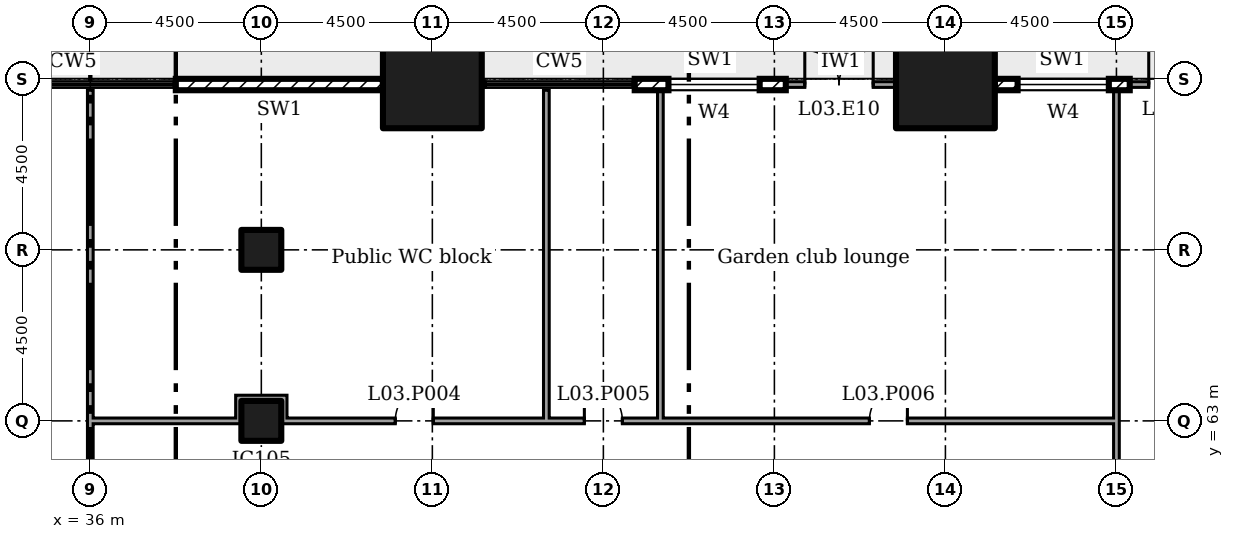
"""IFC4 building model, lengths in metres.
Left out: names, types, materials, properties, quantities, classifications, styles, units other than length and angle.
Written with IfcOpenShell. Run it as: python <this file> out.ifc"""

import sys

from ifc_helpers import new_model, si_unit, direction, frame, frame_2d, origin, origin_2d, place, context, subcontext, project, spatial, rectangle, extrude, element, fill, save


model = new_model("IFC4")
c1 = context("Model", 3, precision=1e-05, world=origin(), true_north=direction((0.0, 1.0)))
c2 = subcontext(c1, "Body", "Model", "MODEL_VIEW")
j1 = project(units=[si_unit("LENGTHUNIT", "METRE"), si_unit("PLANEANGLEUNIT", "RADIAN")], contexts=[c1])
p1 = place(None, origin())
s1 = spatial("IfcSite", under=j1, at=p1, CompositionType="ELEMENT")
p2 = place(p1, origin())
s2 = spatial("IfcBuilding", under=s1, at=p2, CompositionType="ELEMENT")
p3 = place(p2, frame((0.0, 0.0, 16.5)))
s3 = spatial("IfcBuildingStorey", under=s2, at=p3, CompositionType="ELEMENT", Elevation=16.5)
for number, where in (
    (1, (45.0, 72.0, 0.0)),
    (2, (58.5, 72.0, 0.0)),
):
    element("IfcColumn", number, at=place(p3, frame(where)), inside=s3, PredefinedType="COLUMN", context=c2, shape_type="SweptSolid", body=[
        extrude(rectangle(XDim=2.6, YDim=2.6, at=origin_2d()), origin(), (0.0, 0.0, 1.0), 4.5),
    ])
for number, where in (
    (3, (40.5, 63.0, 0.0)),
    (4, (40.5, 67.5, 0.0)),
):
    element("IfcColumn", number, at=place(p3, frame(where)), inside=s3, PredefinedType="COLUMN", context=c2, shape_type="SweptSolid", body=[
        extrude(rectangle(XDim=1.05, YDim=1.05, at=origin_2d()), origin(), (0.0, 0.0, 1.0), 4.5),
    ])
p4 = place(p3, frame((66.2, 71.85, 0.0), z_axis=(0.0, 0.0, 1.0), x_axis=(-1.0, 0.0, 0.0)))
e5 = element("IfcWall", 5, at=p4, inside=s3, PredefinedType="SOLIDWALL", context=c2, shape_type="SweptSolid", body=[
    extrude(rectangle(XDim=2.85, YDim=0.15, at=frame_2d((1.425, 0.0))), origin(), (0.0, 0.0, 1.0), 2.25),
])
p5 = place(p4, frame((0.55, 0.0, 0.0)))
e6 = element("IfcOpeningElement", 6, at=p5, cuts=e5, PredefinedType="OPENING", context=c2, shape_type="SweptSolid", body=[
    extrude(rectangle(XDim=1.8, YDim=2.1, at=frame_2d((0.9, 1.05))), frame((0.0, 0.085, 0.0), z_axis=(0.0, -1.0, 0.0), x_axis=(1.0, 0.0, 0.0)), (0.0, 0.0, 1.0), 0.17),
])
p6 = place(p3, frame((63.35, 71.85, 0.0), z_axis=(0.0, 0.0, 1.0), x_axis=(-1.0, 0.0, 0.0)))
e7 = element("IfcWall", 7, at=p6, inside=s3, PredefinedType="ELEMENTEDWALL", context=c2, shape_type="SweptSolid", body=[
    extrude(rectangle(XDim=3.55, YDim=0.3, at=frame_2d((1.775, 0.0))), origin(), (0.0, 0.0, 1.0), 2.25),
])
p7 = place(p6, frame((0.55, 0.0, 0.45)))
e8 = element("IfcOpeningElement", 8, at=p7, cuts=e7, PredefinedType="OPENING", context=c2, shape_type="SweptSolid", body=[
    extrude(rectangle(XDim=2.4, YDim=1.7, at=frame_2d((1.2, 0.85))), frame((0.0, 0.16, 0.0), z_axis=(0.0, -1.0, 0.0), x_axis=(1.0, 0.0, 0.0)), (0.0, 0.0, 1.0), 0.32),
])
p8 = place(p3, frame((57.2, 71.85, 0.0), z_axis=(0.0, 0.0, 1.0), x_axis=(-1.0, 0.0, 0.0)))
e9 = element("IfcWall", 9, at=p8, inside=s3, PredefinedType="SOLIDWALL", context=c2, shape_type="SweptSolid", body=[
    extrude(rectangle(XDim=2.9, YDim=0.15, at=frame_2d((1.45, 0.0))), origin(), (0.0, 0.0, 1.0), 2.25),
])
p9 = place(p8, frame((0.6, 0.0, 0.0)))
e10 = element("IfcOpeningElement", 10, at=p9, cuts=e9, PredefinedType="OPENING", context=c2, shape_type="SweptSolid", body=[
    extrude(rectangle(XDim=1.8, YDim=2.1, at=frame_2d((0.9, 1.05))), frame((0.0, 0.085, 0.0), z_axis=(0.0, -1.0, 0.0), x_axis=(1.0, 0.0, 0.0)), (0.0, 0.0, 1.0), 0.17),
])
p10 = place(p3, frame((54.3, 71.85, 0.0), z_axis=(0.0, 0.0, 1.0), x_axis=(-1.0, 0.0, 0.0)))
e11 = element("IfcWall", 11, at=p10, inside=s3, PredefinedType="ELEMENTEDWALL", context=c2, shape_type="SweptSolid", body=[
    extrude(rectangle(XDim=3.975, YDim=0.3, at=frame_2d((1.988, 0.0))), origin(), (0.0, 0.0, 1.0), 2.25),
])
p11 = place(p10, frame((0.688, 0.0, 0.45)))
e12 = element("IfcOpeningElement", 12, at=p11, cuts=e11, PredefinedType="OPENING", context=c2, shape_type="SweptSolid", body=[
    extrude(rectangle(XDim=2.4, YDim=1.7, at=frame_2d((1.2, 0.85))), frame((0.0, 0.16, 0.0), z_axis=(0.0, -1.0, 0.0), x_axis=(1.0, 0.0, 0.0)), (0.0, 0.0, 1.0), 0.32),
])
p12 = place(p3, frame((43.7, 71.85, 0.0), z_axis=(0.0, 0.0, 1.0), x_axis=(-1.0, 0.0, 0.0)))
e13 = element("IfcWall", 13, at=p12, inside=s3, PredefinedType="ELEMENTEDWALL", context=c2, shape_type="SweptSolid", body=[
    extrude(rectangle(XDim=5.45, YDim=0.3, at=frame_2d((2.725, 0.0))), origin(), (0.0, 0.0, 1.0), 2.25),
])
p13 = place(p3, frame((63.0, 59.02, 0.0), z_axis=(0.0, 0.0, 1.0), x_axis=(0.0, 1.0, 0.0)))
e14 = element("IfcWall", 14, at=p13, inside=s3, PredefinedType="PARTITIONING", context=c2, shape_type="SweptSolid", body=[
    extrude(rectangle(XDim=4.055, YDim=0.15, at=frame_2d((2.027, 0.0))), origin(), (0.0, 0.0, 1.0), 4.05),
])
p14 = place(p13, frame((1.1, 0.0, 0.0)))
e15 = element("IfcOpeningElement", 15, at=p14, cuts=e14, PredefinedType="OPENING", context=c2, shape_type="SweptSolid", body=[
    extrude(rectangle(XDim=1.8, YDim=2.1, at=frame_2d((0.9, 1.05))), frame((0.0, 0.085, 0.0), z_axis=(0.0, -1.0, 0.0), x_axis=(1.0, 0.0, 0.0)), (0.0, 0.0, 1.0), 0.17),
])
p15 = place(p3, frame((63.0, 63.0, 0.0), z_axis=(0.0, 0.0, 1.0), x_axis=(0.0, 1.0, 0.0)))
e16 = element("IfcWall", 16, at=p15, inside=s3, PredefinedType="PARTITIONING", context=c2, shape_type="SweptSolid", body=[
    extrude(rectangle(XDim=8.7, YDim=0.15, at=frame_2d((4.35, 0.0))), origin(), (0.0, 0.0, 1.0), 4.05),
])
p16 = place(p3, frame((36.0, 49.5, 0.0), z_axis=(0.0, 0.0, 1.0), x_axis=(0.0, 1.0, 0.0)))
e17 = element("IfcWall", 17, at=p16, inside=s3, PredefinedType="PARTITIONING", context=c2, shape_type="SweptSolid", body=[
    extrude(rectangle(XDim=13.575, YDim=0.15, at=frame_2d((6.788, 0.0))), origin(), (0.0, 0.0, 1.0), 4.05),
])
p17 = place(p16, frame((6.25, 0.0, 0.0)))
e18 = element("IfcOpeningElement", 18, at=p17, cuts=e17, PredefinedType="OPENING", context=c2, shape_type="SweptSolid", body=[
    extrude(rectangle(XDim=1.0, YDim=2.1, at=frame_2d((0.5, 1.05))), frame((0.0, 0.085, 0.0), z_axis=(0.0, -1.0, 0.0), x_axis=(1.0, 0.0, 0.0)), (0.0, 0.0, 1.0), 0.17),
])
for number, where, z_axis, x_axis in (
    (19, (39.9, 62.925, 0.0), (0.0, 0.0, 1.0), (0.0, 1.0, 0.0)),
    (20, (41.1, 62.925, 0.0), (0.0, 0.0, 1.0), (0.0, 1.0, 0.0)),
):
    element("IfcWall", number, at=place(p3, frame(where, z_axis=z_axis, x_axis=x_axis)), inside=s3, PredefinedType="PARTITIONING", context=c2, shape_type="SweptSolid", body=[
        extrude(rectangle(XDim=0.75, YDim=0.15, at=frame_2d((0.375, 0.0))), origin(), (0.0, 0.0, 1.0), 4.05),
    ])
p18 = place(p3, frame((36.075, 63.0, 0.0)))
e21 = element("IfcWall", 21, at=p18, inside=s3, PredefinedType="PARTITIONING", context=c2, shape_type="SweptSolid", body=[
    extrude(rectangle(XDim=3.75, YDim=0.15, at=frame_2d((1.875, 0.0))), origin(), (0.0, 0.0, 1.0), 4.05),
])
p19 = place(p3, frame((41.175, 63.0, 0.0)))
e22 = element("IfcWall", 22, at=p19, inside=s3, PredefinedType="PARTITIONING", context=c2, shape_type="SweptSolid", body=[
    extrude(rectangle(XDim=6.9, YDim=0.15, at=frame_2d((3.45, 0.0))), origin(), (0.0, 0.0, 1.0), 4.05),
])
p20 = place(p19, frame((2.85, 0.0, 0.0)))
e23 = element("IfcOpeningElement", 23, at=p20, cuts=e22, PredefinedType="OPENING", context=c2, shape_type="SweptSolid", body=[
    extrude(rectangle(XDim=1.0, YDim=2.1, at=frame_2d((0.5, 1.05))), frame((0.0, 0.085, 0.0), z_axis=(0.0, -1.0, 0.0), x_axis=(1.0, 0.0, 0.0)), (0.0, 0.0, 1.0), 0.17),
])
p21 = place(p3, frame((39.975, 63.6, 0.0)))
e24 = element("IfcWall", 24, at=p21, inside=s3, PredefinedType="PARTITIONING", context=c2, shape_type="SweptSolid", body=[
    extrude(rectangle(XDim=1.05, YDim=0.15, at=frame_2d((0.525, 0.0))), origin(), (0.0, 0.0, 1.0), 4.05),
])
p22 = place(p3, frame((48.0, 63.0, 0.0)))
e25 = element("IfcWall", 25, at=p22, inside=s3, PredefinedType="PARTITIONING", context=c2, shape_type="SweptSolid", body=[
    extrude(rectangle(XDim=3.075, YDim=0.15, at=frame_2d((1.538, 0.0))), origin(), (0.0, 0.0, 1.0), 4.05),
])
p23 = place(p22, frame((1.0, 0.0, 0.0)))
e26 = element("IfcOpeningElement", 26, at=p23, cuts=e25, PredefinedType="OPENING", context=c2, shape_type="SweptSolid", body=[
    extrude(rectangle(XDim=1.0, YDim=2.1, at=frame_2d((0.5, 1.05))), frame((0.0, 0.085, 0.0), z_axis=(0.0, -1.0, 0.0), x_axis=(1.0, 0.0, 0.0)), (0.0, 0.0, 1.0), 0.17),
])
p24 = place(p3, frame((51.0, 63.0, 0.0)))
e27 = element("IfcWall", 27, at=p24, inside=s3, PredefinedType="PARTITIONING", context=c2, shape_type="SweptSolid", body=[
    extrude(rectangle(XDim=11.925, YDim=0.15, at=frame_2d((5.962, 0.0))), origin(), (0.0, 0.0, 1.0), 4.05),
])
p25 = place(p24, frame((5.5, 0.0, 0.0)))
e28 = element("IfcOpeningElement", 28, at=p25, cuts=e27, PredefinedType="OPENING", context=c2, shape_type="SweptSolid", body=[
    extrude(rectangle(XDim=1.0, YDim=2.1, at=frame_2d((0.5, 1.05))), frame((0.0, 0.085, 0.0), z_axis=(0.0, -1.0, 0.0), x_axis=(1.0, 0.0, 0.0)), (0.0, 0.0, 1.0), 0.17),
])
p26 = place(p3, frame((36.0, 63.0, 0.0), z_axis=(0.0, 0.0, 1.0), x_axis=(0.0, 1.0, 0.0)))
e29 = element("IfcWall", 29, at=p26, inside=s3, PredefinedType="PARTITIONING", context=c2, shape_type="SweptSolid", body=[
    extrude(rectangle(XDim=8.7, YDim=0.15, at=frame_2d((4.35, 0.0))), origin(), (0.0, 0.0, 1.0), 4.05),
])
for number, where, z_axis, x_axis in (
    (30, (48.0, 63.075, 0.0), (0.0, 0.0, 1.0), (0.0, 1.0, 0.0)),
    (31, (51.0, 63.075, 0.0), (0.0, 0.0, 1.0), (0.0, 1.0, 0.0)),
):
    element("IfcWall", number, at=place(p3, frame(where, z_axis=z_axis, x_axis=x_axis)), inside=s3, PredefinedType="PARTITIONING", context=c2, shape_type="SweptSolid", body=[
        extrude(rectangle(XDim=8.625, YDim=0.15, at=frame_2d((4.312, 0.0))), origin(), (0.0, 0.0, 1.0), 4.05),
    ])
p27 = place(p5, frame((1.8, 0.0, 0.0), x_axis=(-1.0, 0.0, 0.0)))
e32 = element("IfcDoor", 32, at=p27, inside=s3, OperationType="DOUBLE_DOOR_DOUBLE_SWING", PredefinedType="NOTDEFINED", context=c2, shape_type="SweptSolid", body=[
    extrude(rectangle(XDim=1.8, YDim=2.1, at=frame_2d((0.9, 1.05))), frame((0.0, 0.025, 0.0), z_axis=(0.0, -1.0, 0.0), x_axis=(1.0, 0.0, 0.0)), (0.0, 0.0, 1.0), 0.05),
])
fill(e6, e32)
p28 = place(p7, origin())
e33 = element("IfcWindow", 33, at=p28, inside=s3, PartitioningType="SINGLE_PANEL", PredefinedType="WINDOW", context=c2, shape_type="SweptSolid", body=[
    extrude(rectangle(XDim=2.4, YDim=1.7, at=frame_2d((1.2, 0.85))), frame((0.0, 0.03, 0.0), z_axis=(0.0, -1.0, 0.0), x_axis=(1.0, 0.0, 0.0)), (0.0, 0.0, 1.0), 0.06),
])
fill(e8, e33)
p29 = place(p9, frame((1.8, 0.0, 0.0), x_axis=(-1.0, 0.0, 0.0)))
e34 = element("IfcDoor", 34, at=p29, inside=s3, OperationType="DOUBLE_DOOR_DOUBLE_SWING", PredefinedType="NOTDEFINED", context=c2, shape_type="SweptSolid", body=[
    extrude(rectangle(XDim=1.8, YDim=2.1, at=frame_2d((0.9, 1.05))), frame((0.0, 0.025, 0.0), z_axis=(0.0, -1.0, 0.0), x_axis=(1.0, 0.0, 0.0)), (0.0, 0.0, 1.0), 0.05),
])
fill(e10, e34)
p30 = place(p11, origin())
e35 = element("IfcWindow", 35, at=p30, inside=s3, PartitioningType="SINGLE_PANEL", PredefinedType="WINDOW", context=c2, shape_type="SweptSolid", body=[
    extrude(rectangle(XDim=2.4, YDim=1.7, at=frame_2d((1.2, 0.85))), frame((0.0, 0.03, 0.0), z_axis=(0.0, -1.0, 0.0), x_axis=(1.0, 0.0, 0.0)), (0.0, 0.0, 1.0), 0.06),
])
fill(e12, e35)
p31 = place(p20, origin())
e36 = element("IfcDoor", 36, at=p31, inside=s3, OperationType="SINGLE_SWING_LEFT", PredefinedType="DOOR", context=c2, shape_type="SweptSolid", body=[
    extrude(rectangle(XDim=1.0, YDim=2.1, at=frame_2d((0.5, 1.05))), frame((0.0, 0.025, 0.0), z_axis=(0.0, -1.0, 0.0), x_axis=(1.0, 0.0, 0.0)), (0.0, 0.0, 1.0), 0.05),
])
fill(e23, e36)
p32 = place(p23, origin())
e37 = element("IfcDoor", 37, at=p32, inside=s3, OperationType="SINGLE_SWING_RIGHT", PredefinedType="DOOR", context=c2, shape_type="SweptSolid", body=[
    extrude(rectangle(XDim=1.0, YDim=2.1, at=frame_2d((0.5, 1.05))), frame((0.0, 0.025, 0.0), z_axis=(0.0, -1.0, 0.0), x_axis=(1.0, 0.0, 0.0)), (0.0, 0.0, 1.0), 0.05),
])
fill(e26, e37)
p33 = place(p25, origin())
e38 = element("IfcDoor", 38, at=p33, inside=s3, OperationType="SINGLE_SWING_LEFT", PredefinedType="DOOR", context=c2, shape_type="SweptSolid", body=[
    extrude(rectangle(XDim=1.0, YDim=2.1, at=frame_2d((0.5, 1.05))), frame((0.0, 0.025, 0.0), z_axis=(0.0, -1.0, 0.0), x_axis=(1.0, 0.0, 0.0)), (0.0, 0.0, 1.0), 0.05),
])
fill(e28, e38)
save(model, sys.argv[1])
